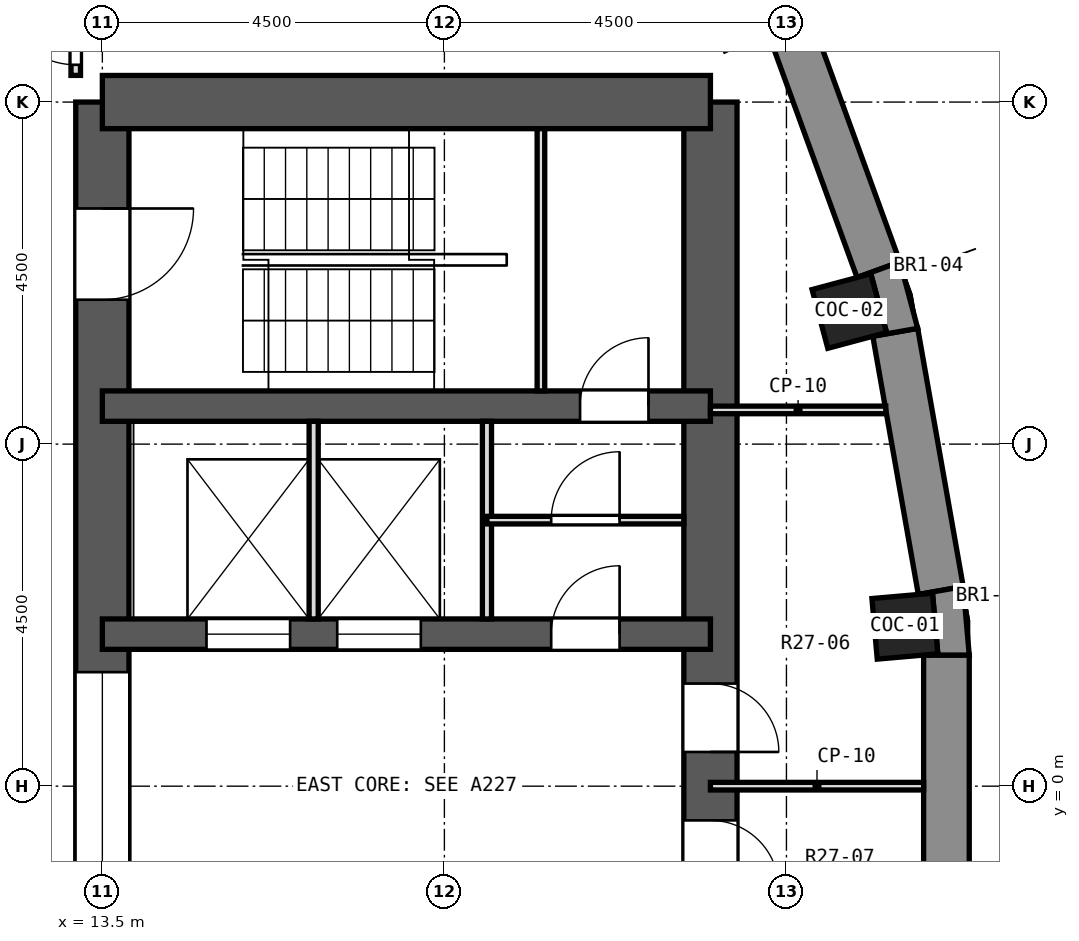
"""IFC4 building model, lengths in metres.
Left out: names, types, materials, properties, quantities, classifications, styles, units other than length and angle.
Written with IfcOpenShell. Run it as: python <this file> out.ifc"""

import sys

from ifc_helpers import new_model, si_unit, direction, frame, frame_2d, origin, origin_2d, place, context, subcontext, project, spatial, polyline, rectangle, outline, extrude, element, fill, save


model = new_model("IFC4")
c1 = context("Model", 3, precision=1e-05, world=origin(), true_north=direction((0.0, 1.0)))
c2 = subcontext(c1, "Body", "Model", "MODEL_VIEW")
j1 = project(units=[si_unit("LENGTHUNIT", "METRE"), si_unit("PLANEANGLEUNIT", "RADIAN")], contexts=[c1])
p1 = place(None, origin())
s1 = spatial("IfcSite", under=j1, at=p1, CompositionType="ELEMENT")
p2 = place(p1, origin())
s2 = spatial("IfcBuilding", under=s1, at=p2, CompositionType="ELEMENT")
p3 = place(p2, frame((0.0, 0.0, 180.6)))
s3 = spatial("IfcBuildingStorey", under=s2, at=p3, CompositionType="ELEMENT", Elevation=180.6)
for number, where, z_axis, x_axis in (
    (1, (24.058, 2.105, 0.0), (0.0, 0.0, 1.0), (0.996, 0.087, 0.0)),
    (2, (23.327, 6.25, 0.0), (0.0, 0.0, 1.0), (0.966, 0.259, 0.0)),
):
    element("IfcColumn", number, at=place(p3, frame(where, z_axis=z_axis, x_axis=x_axis)), inside=s3, PredefinedType="COLUMN", context=c2, shape_type="SweptSolid", body=[
        extrude(rectangle(XDim=0.8, YDim=0.8, at=origin_2d()), origin(), (0.0, 0.0, 1.0), 3.3),
    ])
p4 = place(p3, frame((13.5, -9.0, 0.0), z_axis=(0.0, 0.0, 1.0), x_axis=(0.0, 1.0, 0.0)))
e3 = element("IfcWall", 3, at=p4, inside=s3, PredefinedType="SHEAR", context=c2, shape_type="SweptSolid", body=[
    extrude(rectangle(XDim=18.0, YDim=0.7, at=frame_2d((9.0, 0.0))), origin(), (0.0, 0.0, 1.0), 3.3),
])
p5 = place(p4, frame((15.4, 0.0, 0.0)))
e4 = element("IfcOpeningElement", 4, at=p5, cuts=e3, PredefinedType="OPENING", context=c2, shape_type="SweptSolid", body=[
    extrude(rectangle(XDim=1.2, YDim=2.1, at=frame_2d((0.6, 1.05))), frame((0.0, 0.362, 0.0), z_axis=(0.0, -1.0, 0.0), x_axis=(1.0, 0.0, 0.0)), (0.0, 0.0, 1.0), 0.724),
])
p6 = place(p4, frame((1.4, 0.0, 0.0)))
e5 = element("IfcOpeningElement", 5, at=p6, cuts=e3, PredefinedType="OPENING", context=c2, shape_type="SweptSolid", body=[
    extrude(rectangle(XDim=1.2, YDim=2.1, at=frame_2d((0.6, 1.05))), frame((0.0, 0.362, 0.0), z_axis=(0.0, -1.0, 0.0), x_axis=(1.0, 0.0, 0.0)), (0.0, 0.0, 1.0), 0.724),
])
p7 = place(p4, frame((7.5, 0.0, 0.0)))
e6 = element("IfcOpeningElement", 6, at=p7, cuts=e3, PredefinedType="OPENING", context=c2, shape_type="SweptSolid", body=[
    extrude(rectangle(XDim=3.0, YDim=2.4, at=frame_2d((1.5, 1.2))), frame((0.0, 0.362, 0.0), z_axis=(0.0, -1.0, 0.0), x_axis=(1.0, 0.0, 0.0)), (0.0, 0.0, 1.0), 0.724),
])
p8 = place(p3, frame((21.5, -9.0, 0.0), z_axis=(0.0, 0.0, 1.0), x_axis=(0.0, 1.0, 0.0)))
e7 = element("IfcWall", 7, at=p8, inside=s3, PredefinedType="SHEAR", context=c2, shape_type="SweptSolid", body=[
    extrude(rectangle(XDim=18.0, YDim=0.7, at=frame_2d((9.0, 0.0))), origin(), (0.0, 0.0, 1.0), 3.3),
])
p9 = place(p8, frame((9.45, 0.0, 0.0)))
e8 = element("IfcOpeningElement", 8, at=p9, cuts=e7, PredefinedType="OPENING", context=c2, shape_type="SweptSolid", body=[
    extrude(rectangle(XDim=0.9, YDim=2.1, at=frame_2d((0.45, 1.05))), frame((0.0, 0.362, 0.0), z_axis=(0.0, -1.0, 0.0), x_axis=(1.0, 0.0, 0.0)), (0.0, 0.0, 1.0), 0.724),
])
p10 = place(p8, frame((7.65, 0.0, 0.0)))
e9 = element("IfcOpeningElement", 9, at=p10, cuts=e7, PredefinedType="OPENING", context=c2, shape_type="SweptSolid", body=[
    extrude(rectangle(XDim=0.9, YDim=2.1, at=frame_2d((0.45, 1.05))), frame((0.0, 0.362, 0.0), z_axis=(0.0, -1.0, 0.0), x_axis=(1.0, 0.0, 0.0)), (0.0, 0.0, 1.0), 0.724),
])
p11 = place(p3, frame((13.5, 9.0, 0.0), z_axis=(0.0, 0.0, 1.0), x_axis=(1.0, 0.0, 0.0)))
e10 = element("IfcWall", 10, at=p11, inside=s3, PredefinedType="SHEAR", context=c2, shape_type="SweptSolid", body=[
    extrude(rectangle(XDim=8.0, YDim=0.7, at=frame_2d((4.0, 0.0))), origin(), (0.0, 0.0, 1.0), 3.3),
])
p12 = place(p3, frame((13.5, 5.0, 0.0), z_axis=(0.0, 0.0, 1.0), x_axis=(1.0, 0.0, 0.0)))
e11 = element("IfcWall", 11, at=p12, inside=s3, PredefinedType="SHEAR", context=c2, shape_type="SweptSolid", body=[
    extrude(rectangle(XDim=8.0, YDim=0.4, at=frame_2d((4.0, 0.0))), origin(), (0.0, 0.0, 1.0), 3.3),
])
p13 = place(p12, frame((6.285, 0.0, 0.0)))
e12 = element("IfcOpeningElement", 12, at=p13, cuts=e11, PredefinedType="OPENING", context=c2, shape_type="SweptSolid", body=[
    extrude(rectangle(XDim=0.9, YDim=2.1, at=frame_2d((0.45, 1.05))), frame((0.0, 0.212, 0.0), z_axis=(0.0, -1.0, 0.0), x_axis=(1.0, 0.0, 0.0)), (0.0, 0.0, 1.0), 0.424),
])
p14 = place(p3, frame((13.5, 2.0, 0.0), z_axis=(0.0, 0.0, 1.0), x_axis=(1.0, 0.0, 0.0)))
e13 = element("IfcWall", 13, at=p14, inside=s3, PredefinedType="SHEAR", context=c2, shape_type="SweptSolid", body=[
    extrude(rectangle(XDim=8.0, YDim=0.4, at=frame_2d((4.0, 0.0))), origin(), (0.0, 0.0, 1.0), 3.3),
])
p15 = place(p14, frame((1.37, 0.0, 0.0)))
e14 = element("IfcOpeningElement", 14, at=p15, cuts=e13, PredefinedType="OPENING", context=c2, shape_type="SweptSolid", body=[
    extrude(rectangle(XDim=1.1, YDim=2.1, at=frame_2d((0.55, 1.05))), frame((0.0, 0.212, 0.0), z_axis=(0.0, -1.0, 0.0), x_axis=(1.0, 0.0, 0.0)), (0.0, 0.0, 1.0), 0.424),
])
p16 = place(p14, frame((3.09, 0.0, 0.0)))
e15 = element("IfcOpeningElement", 15, at=p16, cuts=e13, PredefinedType="OPENING", context=c2, shape_type="SweptSolid", body=[
    extrude(rectangle(XDim=1.1, YDim=2.1, at=frame_2d((0.55, 1.05))), frame((0.0, 0.212, 0.0), z_axis=(0.0, -1.0, 0.0), x_axis=(1.0, 0.0, 0.0)), (0.0, 0.0, 1.0), 0.424),
])
p17 = place(p14, frame((5.905, 0.0, 0.0)))
e16 = element("IfcOpeningElement", 16, at=p17, cuts=e13, PredefinedType="OPENING", context=c2, shape_type="SweptSolid", body=[
    extrude(rectangle(XDim=0.9, YDim=2.1, at=frame_2d((0.45, 1.05))), frame((0.0, 0.212, 0.0), z_axis=(0.0, -1.0, 0.0), x_axis=(1.0, 0.0, 0.0)), (0.0, 0.0, 1.0), 0.424),
])
for number, where, z_axis, x_axis in (
    (17, (24.531, 2.574, 0.0), (0.0, 0.0, 1.0), (-0.174, 0.985, 0.0)),
    (18, (23.711, 6.794, 0.0), (0.0, 0.0, 1.0), (-0.342, 0.94, 0.0)),
    (19, (24.605, -1.725, 0.0), (0.0, 0.0, 1.0), (0.0, 1.0, 0.0)),
):
    element("IfcWall", number, at=place(p3, frame(where, z_axis=z_axis, x_axis=x_axis)), inside=s3, PredefinedType="SOLIDWALL", context=c2, shape_type="SweptSolid", body=[
        extrude(rectangle(XDim=3.45, YDim=0.6, at=frame_2d((1.725, 0.0))), origin(), (0.0, 0.0, 1.0), 2.85),
    ])
p18 = place(p3, origin())
e20 = element("IfcWall", 20, at=p18, inside=s3, PredefinedType="SOLIDWALL", context=c2, shape_type="SweptSolid", body=[
    extrude(outline(polyline([(24.905, 1.725), (24.826, 2.626), (24.235, 2.522), (24.422, 2.538), (24.491, 1.741), (24.305, 1.725), (24.905, 1.725)])), origin(), (0.0, 0.0, 1.0), 2.85),
])
p19 = place(p3, origin())
e21 = element("IfcWall", 21, at=p19, inside=s3, PredefinedType="SOLIDWALL", context=c2, shape_type="SweptSolid", body=[
    extrude(outline(polyline([(24.227, 6.023), (23.993, 6.897), (23.429, 6.692), (23.61, 6.74), (23.817, 5.968), (23.636, 5.919), (24.227, 6.023)])), origin(), (0.0, 0.0, 1.0), 2.85),
])
p20 = place(p3, frame((13.15, 9.351, 0.0), z_axis=(0.0, 0.0, 1.0), x_axis=(0.0, 1.0, 0.0)))
e22 = element("IfcWall", 22, at=p20, inside=s3, PredefinedType="PARTITIONING", context=c2, shape_type="SweptSolid", body=[
    extrude(rectangle(XDim=2.216, YDim=0.125, at=frame_2d((1.108, 0.0))), origin(), (0.0, 0.0, 1.0), 2.85),
])
p21 = place(p20, frame((0.139, 0.0, 0.0)))
e23 = element("IfcOpeningElement", 23, at=p21, cuts=e22, PredefinedType="OPENING", context=c2, shape_type="SweptSolid", body=[
    extrude(rectangle(XDim=1.0, YDim=2.1, at=frame_2d((0.5, 1.05))), frame((0.0, 0.074, 0.0), z_axis=(0.0, -1.0, 0.0), x_axis=(1.0, 0.0, 0.0)), (0.0, 0.0, 1.0), 0.149),
])
p22 = place(p3, frame((21.5, 4.95, 0.0), z_axis=(0.0, 0.0, 1.0), x_axis=(1.0, 0.0, 0.0)))
e24 = element("IfcWall", 24, at=p22, inside=s3, PredefinedType="PARTITIONING", context=c2, shape_type="SweptSolid", body=[
    extrude(rectangle(XDim=2.307, YDim=0.1, at=frame_2d((1.153, 0.0))), origin(), (0.0, 0.0, 1.0), 2.85),
])
p23 = place(p3, frame((21.5, 0.0, 0.0), z_axis=(0.0, 0.0, 1.0), x_axis=(1.0, 0.0, 0.0)))
e25 = element("IfcWall", 25, at=p23, inside=s3, PredefinedType="PARTITIONING", context=c2, shape_type="SweptSolid", body=[
    extrude(rectangle(XDim=2.805, YDim=0.1, at=frame_2d((1.402, 0.0))), origin(), (0.0, 0.0, 1.0), 2.85),
])
for number, where, z_axis, x_axis in (
    (26, (16.28, 2.2, 0.0), (0.0, 0.0, 1.0), (0.0, 1.0, 0.0)),
    (27, (18.56, 2.2, 0.0), (0.0, 0.0, 1.0), (0.0, 1.0, 0.0)),
):
    element("IfcWall", number, at=place(p3, frame(where, z_axis=z_axis, x_axis=x_axis)), inside=s3, PredefinedType="PARTITIONING", context=c2, shape_type="SweptSolid", body=[
        extrude(rectangle(XDim=2.6, YDim=0.12, at=frame_2d((1.3, 0.0))), origin(), (0.0, 0.0, 1.0), 2.85),
    ])
p24 = place(p3, frame((18.56, 3.5, 0.0), z_axis=(0.0, 0.0, 1.0), x_axis=(1.0, 0.0, 0.0)))
e28 = element("IfcWall", 28, at=p24, inside=s3, PredefinedType="PARTITIONING", context=c2, shape_type="SweptSolid", body=[
    extrude(rectangle(XDim=2.59, YDim=0.1, at=frame_2d((1.295, 0.0))), origin(), (0.0, 0.0, 1.0), 2.85),
])
p25 = place(p24, frame((0.845, 0.0, 0.0)))
e29 = element("IfcOpeningElement", 29, at=p25, cuts=e28, PredefinedType="OPENING", context=c2, shape_type="SweptSolid", body=[
    extrude(rectangle(XDim=0.9, YDim=2.1, at=frame_2d((0.45, 1.05))), frame((0.0, 0.062, 0.0), z_axis=(0.0, -1.0, 0.0), x_axis=(1.0, 0.0, 0.0)), (0.0, 0.0, 1.0), 0.124),
])
p26 = place(p3, frame((19.27, 5.2, 0.0), z_axis=(0.0, 0.0, 1.0), x_axis=(0.0, 1.0, 0.0)))
e30 = element("IfcWall", 30, at=p26, inside=s3, PredefinedType="PARTITIONING", context=c2, shape_type="SweptSolid", body=[
    extrude(rectangle(XDim=3.45, YDim=0.1, at=frame_2d((1.725, 0.0))), origin(), (0.0, 0.0, 1.0), 2.85),
])
p27 = place(p21, origin())
e31 = element("IfcDoor", 31, at=p27, inside=s3, OperationType="SINGLE_SWING_RIGHT", PredefinedType="DOOR", context=c2, shape_type="SweptSolid", body=[
    extrude(rectangle(XDim=1.0, YDim=2.1, at=frame_2d((0.5, 1.05))), frame((0.0, 0.025, 0.0), z_axis=(0.0, -1.0, 0.0), x_axis=(1.0, 0.0, 0.0)), (0.0, 0.0, 1.0), 0.05),
])
fill(e23, e31)
p28 = place(p15, origin())
e32 = element("IfcDoor", 32, at=p28, inside=s3, OperationType="DOUBLE_DOOR_SLIDING", PredefinedType="DOOR", context=c2, shape_type="SweptSolid", body=[
    extrude(rectangle(XDim=1.1, YDim=2.1, at=frame_2d((0.55, 1.05))), frame((0.0, 0.025, 0.0), z_axis=(0.0, -1.0, 0.0), x_axis=(1.0, 0.0, 0.0)), (0.0, 0.0, 1.0), 0.05),
])
fill(e14, e32)
p29 = place(p16, origin())
e33 = element("IfcDoor", 33, at=p29, inside=s3, OperationType="DOUBLE_DOOR_SLIDING", PredefinedType="DOOR", context=c2, shape_type="SweptSolid", body=[
    extrude(rectangle(XDim=1.1, YDim=2.1, at=frame_2d((0.55, 1.05))), frame((0.0, 0.025, 0.0), z_axis=(0.0, -1.0, 0.0), x_axis=(1.0, 0.0, 0.0)), (0.0, 0.0, 1.0), 0.05),
])
fill(e15, e33)
p30 = place(p17, origin())
e34 = element("IfcDoor", 34, at=p30, inside=s3, OperationType="SINGLE_SWING_RIGHT", PredefinedType="DOOR", context=c2, shape_type="SweptSolid", body=[
    extrude(rectangle(XDim=0.9, YDim=2.1, at=frame_2d((0.45, 1.05))), frame((0.0, 0.025, 0.0), z_axis=(0.0, -1.0, 0.0), x_axis=(1.0, 0.0, 0.0)), (0.0, 0.0, 1.0), 0.05),
])
fill(e16, e34)
p31 = place(p9, frame((0.9, 0.0, 0.0), z_axis=(0.0, 0.0, 1.0), x_axis=(-1.0, 0.0, 0.0)))
e35 = element("IfcDoor", 35, at=p31, inside=s3, OperationType="SINGLE_SWING_RIGHT", PredefinedType="DOOR", context=c2, shape_type="SweptSolid", body=[
    extrude(rectangle(XDim=0.9, YDim=2.1, at=frame_2d((0.45, 1.05))), frame((0.0, 0.025, 0.0), z_axis=(0.0, -1.0, 0.0), x_axis=(1.0, 0.0, 0.0)), (0.0, 0.0, 1.0), 0.05),
])
fill(e8, e35)
p32 = place(p10, frame((0.9, 0.0, 0.0), z_axis=(0.0, 0.0, 1.0), x_axis=(-1.0, 0.0, 0.0)))
e36 = element("IfcDoor", 36, at=p32, inside=s3, OperationType="SINGLE_SWING_RIGHT", PredefinedType="DOOR", context=c2, shape_type="SweptSolid", body=[
    extrude(rectangle(XDim=0.9, YDim=2.1, at=frame_2d((0.45, 1.05))), frame((0.0, 0.025, 0.0), z_axis=(0.0, -1.0, 0.0), x_axis=(1.0, 0.0, 0.0)), (0.0, 0.0, 1.0), 0.05),
])
fill(e9, e36)
p33 = place(p25, origin())
e37 = element("IfcDoor", 37, at=p33, inside=s3, OperationType="SINGLE_SWING_RIGHT", PredefinedType="DOOR", context=c2, shape_type="SweptSolid", body=[
    extrude(rectangle(XDim=0.9, YDim=2.1, at=frame_2d((0.45, 1.05))), frame((0.0, 0.025, 0.0), z_axis=(0.0, -1.0, 0.0), x_axis=(1.0, 0.0, 0.0)), (0.0, 0.0, 1.0), 0.05),
])
fill(e29, e37)
p34 = place(p13, origin())
e38 = element("IfcDoor", 38, at=p34, inside=s3, OperationType="SINGLE_SWING_RIGHT", PredefinedType="DOOR", context=c2, shape_type="SweptSolid", body=[
    extrude(rectangle(XDim=0.9, YDim=2.1, at=frame_2d((0.45, 1.05))), frame((0.0, 0.025, 0.0), z_axis=(0.0, -1.0, 0.0), x_axis=(1.0, 0.0, 0.0)), (0.0, 0.0, 1.0), 0.05),
])
fill(e12, e38)
p35 = place(p5, frame((1.2, 0.0, 0.0), z_axis=(0.0, 0.0, 1.0), x_axis=(-1.0, 0.0, 0.0)))
e39 = element("IfcDoor", 39, at=p35, inside=s3, OperationType="SINGLE_SWING_LEFT", PredefinedType="DOOR", context=c2, shape_type="SweptSolid", body=[
    extrude(rectangle(XDim=1.2, YDim=2.1, at=frame_2d((0.6, 1.05))), frame((0.0, 0.025, 0.0), z_axis=(0.0, -1.0, 0.0), x_axis=(1.0, 0.0, 0.0)), (0.0, 0.0, 1.0), 0.05),
])
fill(e4, e39)
p36 = place(p7, origin())
e40 = element("IfcDoor", 40, at=p36, inside=s3, OperationType="DOUBLE_DOOR_SLIDING", PredefinedType="DOOR", context=c2, shape_type="SweptSolid", body=[
    extrude(rectangle(XDim=3.0, YDim=2.4, at=frame_2d((1.5, 1.2))), frame((0.0, 0.025, 0.0), z_axis=(0.0, -1.0, 0.0), x_axis=(1.0, 0.0, 0.0)), (0.0, 0.0, 1.0), 0.05),
])
fill(e6, e40)
save(model, sys.argv[1])
